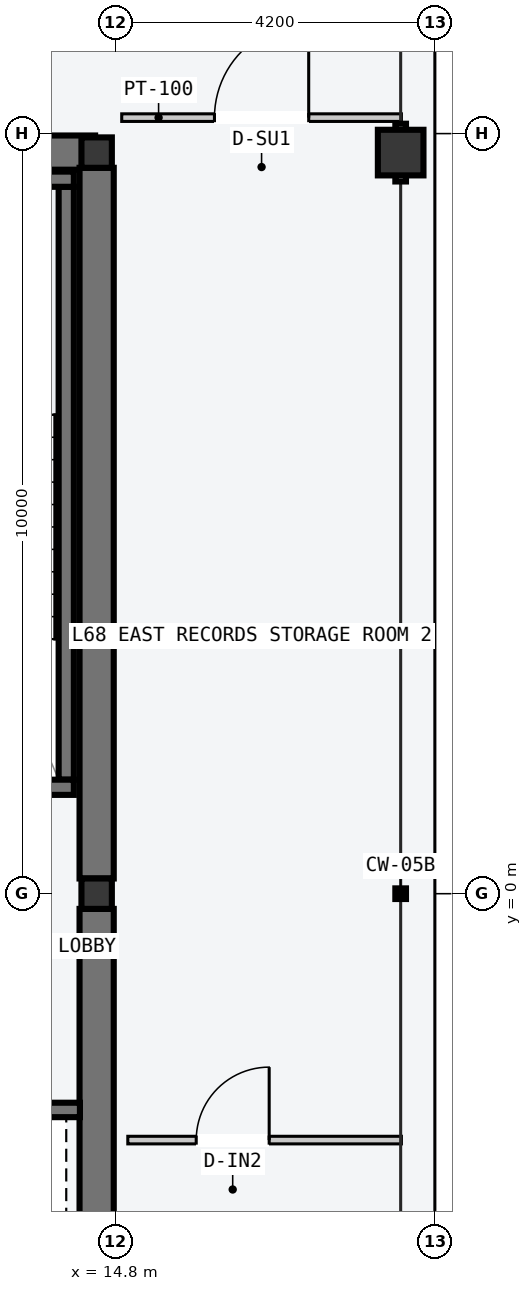
"""IFC4 building model, lengths in metres.
Left out: names, types, materials, properties, quantities, classifications, styles, units other than length and angle.
Written with IfcOpenShell. Run it as: python <this file> out.ifc"""

import sys

from ifc_helpers import new_model, si_unit, direction, frame, frame_2d, origin, origin_2d, place, context, subcontext, project, spatial, rectangle, hollow_rectangle, i_section, extrude, element, fill, save


model = new_model("IFC4")
c1 = context("Model", 3, precision=1e-05, world=origin(), true_north=direction((0.0, 1.0)))
c2 = subcontext(c1, "Body", "Model", "MODEL_VIEW")
j1 = project(units=[si_unit("LENGTHUNIT", "METRE"), si_unit("PLANEANGLEUNIT", "RADIAN")], contexts=[c1])
p1 = place(None, origin())
s1 = spatial("IfcSite", under=j1, at=p1, CompositionType="ELEMENT")
p2 = place(p1, origin())
s2 = spatial("IfcBuilding", under=s1, at=p2, CompositionType="ELEMENT")
p3 = place(p2, frame((0.0, 0.0, 258.0)))
s3 = spatial("IfcBuildingStorey", under=s2, at=p3, CompositionType="ELEMENT", Elevation=258.0)
p4 = place(p3, frame((8.07, 9.75, -0.2), z_axis=(0.0, 0.0, 1.0), x_axis=(1.0, 0.0, 0.0)))
e1 = element("IfcWall", 1, at=p4, inside=s3, PredefinedType="SHEAR", context=c2, shape_type="SweptSolid", body=[
    extrude(rectangle(XDim=6.46, YDim=0.45, at=frame_2d((3.23, 0.0))), origin(), (0.0, 0.0, 1.0), 3.6),
])
for number, where, z_axis, x_axis in (
    (2, (14.55, -9.55, -0.2), (0.0, 0.0, 1.0), (0.0, 1.0, 0.0)),
    (3, (14.55, 0.2, -0.2), (0.0, 0.0, 1.0), (0.0, 1.0, 0.0)),
):
    element("IfcWall", number, at=place(p3, frame(where, z_axis=z_axis, x_axis=x_axis)), inside=s3, PredefinedType="SHEAR", context=c2, shape_type="SweptSolid", body=[
        extrude(rectangle(XDim=9.35, YDim=0.45, at=frame_2d((4.675, 0.0))), origin(), (0.0, 0.0, 1.0), 3.6),
    ])
p5 = place(p3, frame((14.15, 1.5, -0.2), z_axis=(0.0, 0.0, 1.0), x_axis=(0.0, 1.0, 0.0)))
e4 = element("IfcWall", 4, at=p5, inside=s3, PredefinedType="SOLIDWALL", context=c2, shape_type="SweptSolid", body=[
    extrude(rectangle(XDim=7.8, YDim=0.2, at=frame_2d((3.9, 0.0))), origin(), (0.0, 0.0, 1.0), 3.6),
])
p6 = place(p3, frame((10.53, 1.4, -0.2), z_axis=(0.0, 0.0, 1.0), x_axis=(1.0, 0.0, 0.0)))
e5 = element("IfcWall", 5, at=p6, inside=s3, PredefinedType="SOLIDWALL", context=c2, shape_type="SweptSolid", body=[
    extrude(rectangle(XDim=3.72, YDim=0.2, at=frame_2d((1.86, 0.0))), origin(), (0.0, 0.0, 1.0), 3.6),
])
p7 = place(p6, frame((1.5, 0.0, 0.2)))
e6 = element("IfcOpeningElement", 6, at=p7, cuts=e5, PredefinedType="OPENING", context=c2, shape_type="SweptSolid", body=[
    extrude(rectangle(XDim=1.12, YDim=2.18, at=frame_2d((0.56, 1.09))), frame((0.0, 0.11, 0.0), z_axis=(0.0, -1.0, 0.0), x_axis=(1.0, 0.0, 0.0)), (0.0, 0.0, 1.0), 0.22),
])
p8 = place(p3, frame((10.53, 9.4, -0.2), z_axis=(0.0, 0.0, 1.0), x_axis=(1.0, 0.0, 0.0)))
e7 = element("IfcWall", 7, at=p8, inside=s3, PredefinedType="SOLIDWALL", context=c2, shape_type="SweptSolid", body=[
    extrude(rectangle(XDim=3.72, YDim=0.2, at=frame_2d((1.86, 0.0))), origin(), (0.0, 0.0, 1.0), 3.6),
])
for number, where, z_axis, x_axis in (
    (8, (14.55, 0.0, 0.0), (0.0, 0.0, 1.0), (1.0, 0.0, 0.0)),
    (9, (14.55, 9.75, 0.0), (0.0, 0.0, 1.0), (1.0, 0.0, 0.0)),
):
    element("IfcColumn", number, at=place(p3, frame(where, z_axis=z_axis, x_axis=x_axis)), inside=s3, PredefinedType="COLUMN", context=c2, shape_type="SweptSolid", body=[
        extrude(i_section(OverallWidth=0.4, OverallDepth=0.4, WebThickness=0.013, FlangeThickness=0.021, at=origin_2d()), origin(), (0.0, 0.0, 1.0), 3.6),
    ])
p9 = place(p3, frame((18.55, 9.75, 0.0), z_axis=(0.0, 0.0, 1.0), x_axis=(0.0, 1.0, 0.0)))
e10 = element("IfcColumn", 10, at=p9, inside=s3, PredefinedType="COLUMN", context=c2, shape_type="SweptSolid", body=[
    extrude(hollow_rectangle(XDim=0.6, YDim=0.6, WallThickness=0.025, at=origin_2d()), origin(), (0.0, 0.0, 1.0), 3.6),
])
p10 = place(p3, frame((11.65, -2.845, -0.2), z_axis=(0.0, 0.0, 1.0), x_axis=(1.0, 0.0, 0.0)))
e11 = element("IfcWall", 11, at=p10, inside=s3, PredefinedType="SOLIDWALL", context=c2, shape_type="SweptSolid", body=[
    extrude(rectangle(XDim=2.68, YDim=0.19, at=frame_2d((1.34, 0.0))), origin(), (0.0, 0.0, 1.0), 3.6),
])
p11 = place(p10, frame((0.65, 0.0, 0.2)))
e12 = element("IfcOpeningElement", 12, at=p11, cuts=e11, PredefinedType="OPENING", context=c2, shape_type="SweptSolid", body=[
    extrude(rectangle(XDim=1.2, YDim=2.2, at=frame_2d((0.6, 1.1))), frame((0.0, 0.105, 0.0), z_axis=(0.0, -1.0, 0.0), x_axis=(1.0, 0.0, 0.0)), (0.0, 0.0, 1.0), 0.21),
])
p12 = place(p3, frame((14.88, 10.21, 0.0), z_axis=(0.0, 0.0, 1.0), x_axis=(1.0, 0.0, 0.0)))
e13 = element("IfcWall", 13, at=p12, inside=s3, PredefinedType="PARTITIONING", context=c2, shape_type="SweptSolid", body=[
    extrude(rectangle(XDim=3.68, YDim=0.1, at=frame_2d((1.84, 0.0))), origin(), (0.0, 0.0, 1.0), 3.4),
])
p13 = place(p12, frame((1.22, 0.0, 0.0)))
e14 = element("IfcOpeningElement", 14, at=p13, cuts=e13, PredefinedType="OPENING", context=c2, shape_type="SweptSolid", body=[
    extrude(rectangle(XDim=1.24, YDim=2.24, at=frame_2d((0.62, 1.12))), frame((0.0, 0.06, 0.0), z_axis=(0.0, -1.0, 0.0), x_axis=(1.0, 0.0, 0.0)), (0.0, 0.0, 1.0), 0.12),
])
p14 = place(p3, frame((14.96, -3.242, 0.0), z_axis=(0.0, 0.0, 1.0), x_axis=(1.0, 0.0, 0.0)))
e15 = element("IfcWall", 15, at=p14, inside=s3, PredefinedType="PARTITIONING", context=c2, shape_type="SweptSolid", body=[
    extrude(rectangle(XDim=3.6, YDim=0.1, at=frame_2d((1.8, 0.0))), origin(), (0.0, 0.0, 1.0), 3.05),
])
p15 = place(p14, frame((0.9, 0.0, 0.0)))
e16 = element("IfcOpeningElement", 16, at=p15, cuts=e15, PredefinedType="OPENING", context=c2, shape_type="SweptSolid", body=[
    extrude(rectangle(XDim=0.96, YDim=2.18, at=frame_2d((0.48, 1.09))), frame((0.0, 0.06, 0.0), z_axis=(0.0, -1.0, 0.0), x_axis=(1.0, 0.0, 0.0)), (0.0, 0.0, 1.0), 0.12),
])
p16 = place(p13, origin())
e17 = element("IfcDoor", 17, at=p16, inside=s3, OperationType="SINGLE_SWING_RIGHT", PredefinedType="DOOR", context=c2, shape_type="SweptSolid", body=[
    extrude(rectangle(XDim=1.24, YDim=2.24, at=frame_2d((0.62, 1.12))), frame((0.0, 0.025, 0.0), z_axis=(0.0, -1.0, 0.0), x_axis=(1.0, 0.0, 0.0)), (0.0, 0.0, 1.0), 0.05),
])
fill(e14, e17)
p17 = place(p15, origin())
e18 = element("IfcDoor", 18, at=p17, inside=s3, OperationType="SINGLE_SWING_RIGHT", PredefinedType="DOOR", context=c2, shape_type="SweptSolid", body=[
    extrude(rectangle(XDim=0.96, YDim=2.18, at=frame_2d((0.48, 1.09))), frame((0.0, 0.025, 0.0), z_axis=(0.0, -1.0, 0.0), x_axis=(1.0, 0.0, 0.0)), (0.0, 0.0, 1.0), 0.05),
])
fill(e16, e18)
save(model, sys.argv[1])
